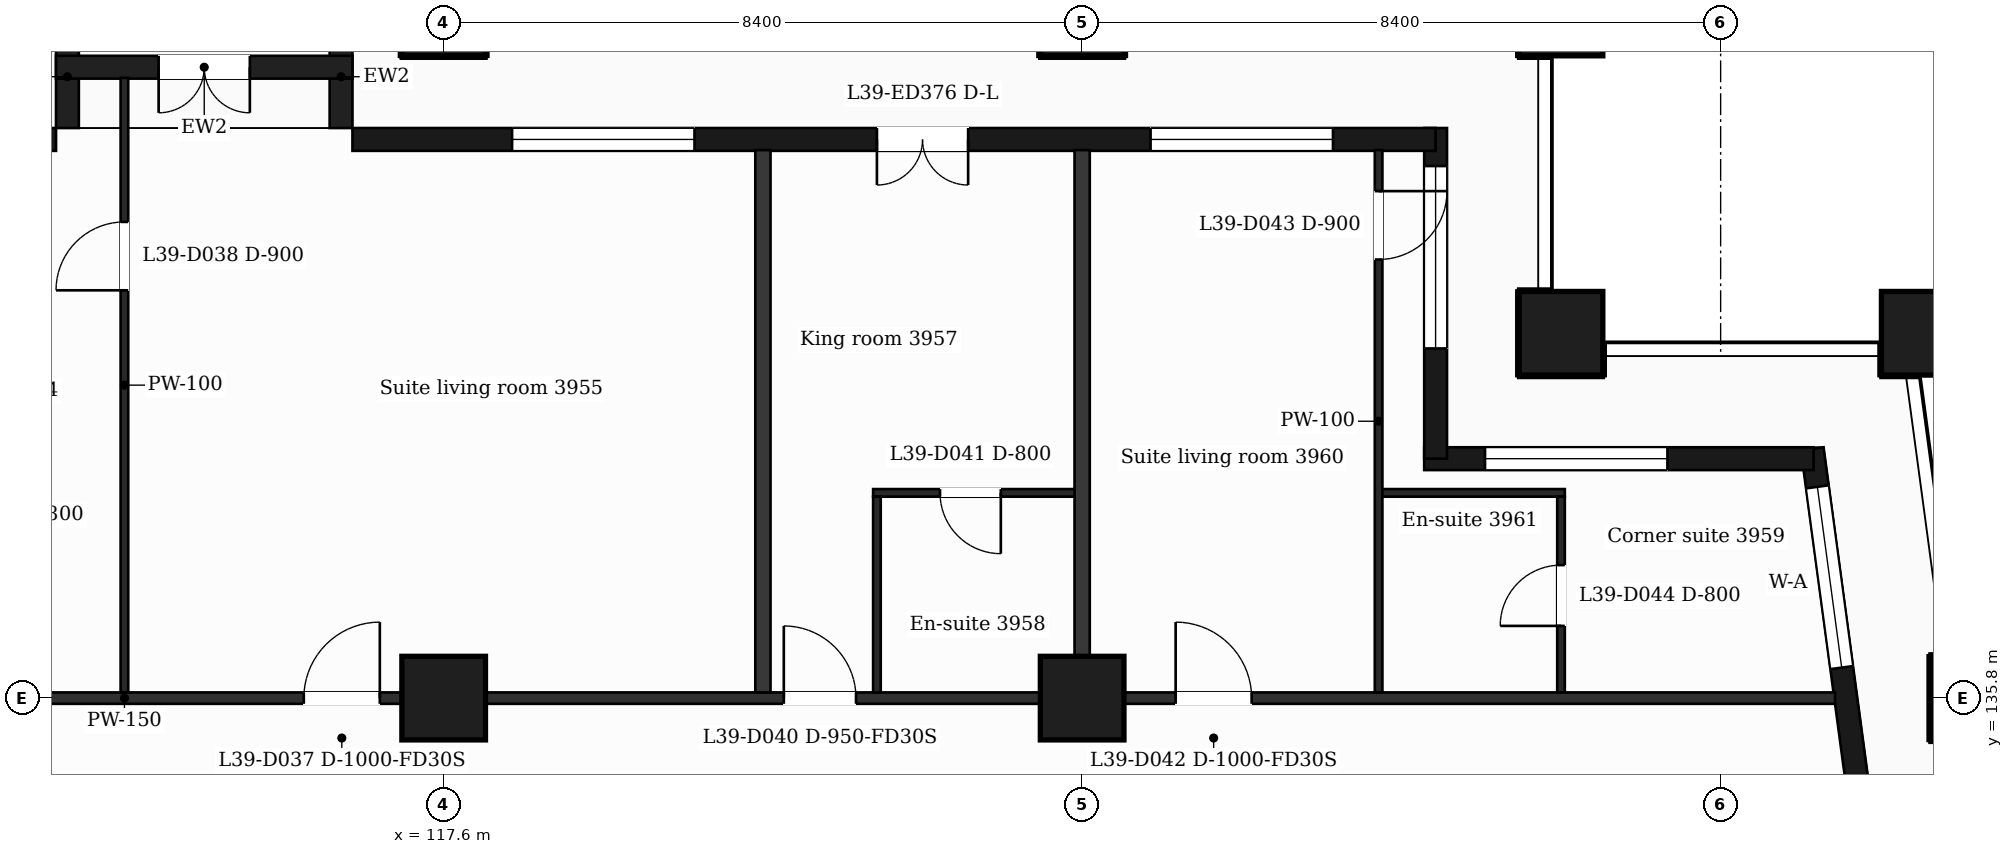
"""IFC4 building model, lengths in metres.
Left out: names, types, materials, properties, quantities, classifications, styles, units other than length and angle.
Written with IfcOpenShell. Run it as: python <this file> out.ifc"""

import sys

from ifc_helpers import new_model, si_unit, direction, frame, frame_2d, origin, origin_2d, place, context, subcontext, project, spatial, rectangle, extrude, element, fill, save


model = new_model("IFC4")
c1 = context("Model", 3, precision=1e-05, world=origin(), true_north=direction((0.0, 1.0)))
c2 = subcontext(c1, "Body", "Model", "MODEL_VIEW")
j1 = project(units=[si_unit("LENGTHUNIT", "METRE"), si_unit("PLANEANGLEUNIT", "RADIAN")], contexts=[c1])
p1 = place(None, origin())
s1 = spatial("IfcSite", under=j1, at=p1, CompositionType="ELEMENT")
p2 = place(p1, origin())
s2 = spatial("IfcBuilding", under=s1, at=p2, CompositionType="ELEMENT")
p3 = place(p2, frame((0.0, 0.0, 166.3)))
s3 = spatial("IfcBuildingStorey", under=s2, at=p3, CompositionType="ELEMENT", Elevation=166.3)
for number, where, z_axis, x_axis in (
    (1, (132.3, 140.6, 0.0), (0.0, 0.0, 1.0), (1.0, 0.0, 0.0)),
    (2, (137.065, 140.6, 0.0), (0.0, 0.0, 1.0), (1.0, 0.0, 0.0)),
    (3, (117.6, 135.8, 0.0), (0.0, 0.0, 1.0), (1.0, 0.0, 0.0)),
    (4, (126.0, 135.8, 0.0), (0.0, 0.0, 1.0), (1.0, 0.0, 0.0)),
    (5, (137.711, 135.8, 0.0), (0.0, 0.0, 1.0), (1.0, 0.0, 0.0)),
    (6, (117.6, 144.8, 0.0), (0.0, 0.0, 1.0), (1.0, 0.0, 0.0)),
    (7, (126.0, 144.8, 0.0), (0.0, 0.0, 1.0), (1.0, 0.0, 0.0)),
    (8, (132.3, 144.8, 0.0), (0.0, 0.0, 1.0), (1.0, 0.0, 0.0)),
):
    element("IfcColumn", number, at=place(p3, frame(where, z_axis=z_axis, x_axis=x_axis)), inside=s3, PredefinedType="COLUMN", context=c2, shape_type="SweptSolid", body=[
        extrude(rectangle(XDim=1.1, YDim=1.1, at=origin_2d()), origin(), (0.0, 0.0, 1.0), 3.7),
    ])
p4 = place(p3, frame((136.504, 132.4, 0.0), z_axis=(0.0, 0.0, 1.0), x_axis=(-0.133399697462, 0.99106231929, 0.0)))
e9 = element("IfcWall", 9, at=p4, inside=s3, PredefinedType="SOLIDWALL", context=c2, shape_type="SweptSolid", body=[
    extrude(rectangle(XDim=6.74, YDim=0.3, at=frame_2d((3.37, 0.0))), origin(), (0.0, 0.0, 1.0), 3.38),
])
p5 = place(p4, frame((1.115, 0.0, 0.0)))
e10 = element("IfcOpeningElement", 10, at=p5, cuts=e9, PredefinedType="OPENING", context=c2, shape_type="SweptSolid", body=[
    extrude(rectangle(XDim=1.2, YDim=2.4, at=frame_2d((0.6, 1.2))), frame((0.0, 0.16, 0.0), z_axis=(0.0, -1.0, 0.0), x_axis=(1.0, 0.0, 0.0)), (0.0, 0.0, 1.0), 0.32),
])
p6 = place(p4, frame((3.835, 0.0, 0.9)))
e11 = element("IfcOpeningElement", 11, at=p6, cuts=e9, PredefinedType="OPENING", context=c2, shape_type="SweptSolid", body=[
    extrude(rectangle(XDim=2.4, YDim=2.1, at=frame_2d((1.2, 1.05))), frame((0.0, 0.16, 0.0), z_axis=(0.0, -1.0, 0.0), x_axis=(1.0, 0.0, 0.0)), (0.0, 0.0, 1.0), 0.32),
])
p7 = place(p3, frame((135.623, 138.95, 0.0), z_axis=(0.0, 0.0, 1.0), x_axis=(-1.0, 0.0, 0.0)))
e12 = element("IfcWall", 12, at=p7, inside=s3, PredefinedType="SOLIDWALL", context=c2, shape_type="SweptSolid", body=[
    extrude(rectangle(XDim=5.123, YDim=0.3, at=frame_2d((2.561, 0.0))), origin(), (0.0, 0.0, 1.0), 3.38),
])
p8 = place(p7, frame((1.923, 0.0, 0.9)))
e13 = element("IfcOpeningElement", 13, at=p8, cuts=e12, PredefinedType="OPENING", context=c2, shape_type="SweptSolid", body=[
    extrude(rectangle(XDim=2.4, YDim=2.1, at=frame_2d((1.2, 1.05))), frame((0.0, 0.16, 0.0), z_axis=(0.0, -1.0, 0.0), x_axis=(1.0, 0.0, 0.0)), (0.0, 0.0, 1.0), 0.32),
])
p9 = place(p3, frame((130.65, 138.95, 0.0), z_axis=(0.0, 0.0, 1.0), x_axis=(0.0, 1.0, 0.0)))
e14 = element("IfcWall", 14, at=p9, inside=s3, PredefinedType="SOLIDWALL", context=c2, shape_type="SweptSolid", body=[
    extrude(rectangle(XDim=4.35, YDim=0.3, at=frame_2d((2.175, 0.0))), origin(), (0.0, 0.0, 1.0), 3.38),
])
p10 = place(p9, frame((1.45, 0.0, 0.9)))
e15 = element("IfcOpeningElement", 15, at=p10, cuts=e14, PredefinedType="OPENING", context=c2, shape_type="SweptSolid", body=[
    extrude(rectangle(XDim=2.4, YDim=2.1, at=frame_2d((1.2, 1.05))), frame((0.0, 0.16, 0.0), z_axis=(0.0, -1.0, 0.0), x_axis=(1.0, 0.0, 0.0)), (0.0, 0.0, 1.0), 0.32),
])
p11 = place(p3, frame((130.65, 143.15, 0.0), z_axis=(0.0, 0.0, 1.0), x_axis=(-1.0, 0.0, 0.0)))
e16 = element("IfcWall", 16, at=p11, inside=s3, PredefinedType="SOLIDWALL", context=c2, shape_type="SweptSolid", body=[
    extrude(rectangle(XDim=14.25, YDim=0.3, at=frame_2d((7.125, 0.0))), origin(), (0.0, 0.0, 1.0), 3.38),
])
p12 = place(p11, frame((1.35, 0.0, 0.9)))
e17 = element("IfcOpeningElement", 17, at=p12, cuts=e16, PredefinedType="OPENING", context=c2, shape_type="SweptSolid", body=[
    extrude(rectangle(XDim=2.4, YDim=2.1, at=frame_2d((1.2, 1.05))), frame((0.0, 0.16, 0.0), z_axis=(0.0, -1.0, 0.0), x_axis=(1.0, 0.0, 0.0)), (0.0, 0.0, 1.0), 0.32),
])
p13 = place(p11, frame((6.15, 0.0, 0.0)))
e18 = element("IfcOpeningElement", 18, at=p13, cuts=e16, PredefinedType="OPENING", context=c2, shape_type="SweptSolid", body=[
    extrude(rectangle(XDim=1.2, YDim=2.4, at=frame_2d((0.6, 1.2))), frame((0.0, 0.16, 0.0), z_axis=(0.0, -1.0, 0.0), x_axis=(1.0, 0.0, 0.0)), (0.0, 0.0, 1.0), 0.32),
])
p14 = place(p11, frame((9.75, 0.0, 0.9)))
e19 = element("IfcOpeningElement", 19, at=p14, cuts=e16, PredefinedType="OPENING", context=c2, shape_type="SweptSolid", body=[
    extrude(rectangle(XDim=2.4, YDim=2.1, at=frame_2d((1.2, 1.05))), frame((0.0, 0.16, 0.0), z_axis=(0.0, -1.0, 0.0), x_axis=(1.0, 0.0, 0.0)), (0.0, 0.0, 1.0), 0.32),
])
p15 = place(p3, frame((112.5, 143.15, 0.0), z_axis=(0.0, 0.0, 1.0), x_axis=(-1.0, 0.0, 0.0)))
e20 = element("IfcWall", 20, at=p15, inside=s3, PredefinedType="SOLIDWALL", context=c2, shape_type="SweptSolid", body=[
    extrude(rectangle(XDim=16.5, YDim=0.3, at=frame_2d((8.25, 0.0))), origin(), (0.0, 0.0, 1.0), 3.38),
])
p16 = place(p15, frame((1.1, 0.0, 0.9)))
e21 = element("IfcOpeningElement", 21, at=p16, cuts=e20, PredefinedType="OPENING", context=c2, shape_type="SweptSolid", body=[
    extrude(rectangle(XDim=1.2, YDim=2.1, at=frame_2d((0.6, 1.05))), frame((0.0, 0.16, 0.0), z_axis=(0.0, -1.0, 0.0), x_axis=(1.0, 0.0, 0.0)), (0.0, 0.0, 1.0), 0.32),
])
p17 = place(p15, frame((4.2, 0.0, 0.9)))
e22 = element("IfcOpeningElement", 22, at=p17, cuts=e20, PredefinedType="OPENING", context=c2, shape_type="SweptSolid", body=[
    extrude(rectangle(XDim=2.4, YDim=2.1, at=frame_2d((1.2, 1.05))), frame((0.0, 0.16, 0.0), z_axis=(0.0, -1.0, 0.0), x_axis=(1.0, 0.0, 0.0)), (0.0, 0.0, 1.0), 0.32),
])
p18 = place(p15, frame((8.4, 0.0, 0.9)))
e23 = element("IfcOpeningElement", 23, at=p18, cuts=e20, PredefinedType="OPENING", context=c2, shape_type="SweptSolid", body=[
    extrude(rectangle(XDim=2.4, YDim=2.1, at=frame_2d((1.2, 1.05))), frame((0.0, 0.16, 0.0), z_axis=(0.0, -1.0, 0.0), x_axis=(1.0, 0.0, 0.0)), (0.0, 0.0, 1.0), 0.32),
])
p19 = place(p15, frame((12.3, 0.0, 0.0)))
e24 = element("IfcOpeningElement", 24, at=p19, cuts=e20, PredefinedType="OPENING", context=c2, shape_type="SweptSolid", body=[
    extrude(rectangle(XDim=1.2, YDim=2.4, at=frame_2d((0.6, 1.2))), frame((0.0, 0.16, 0.0), z_axis=(0.0, -1.0, 0.0), x_axis=(1.0, 0.0, 0.0)), (0.0, 0.0, 1.0), 0.32),
])
p20 = place(p15, frame((14.1, 0.0, 0.9)))
e25 = element("IfcOpeningElement", 25, at=p20, cuts=e20, PredefinedType="OPENING", context=c2, shape_type="SweptSolid", body=[
    extrude(rectangle(XDim=1.2, YDim=2.1, at=frame_2d((0.6, 1.05))), frame((0.0, 0.16, 0.0), z_axis=(0.0, -1.0, 0.0), x_axis=(1.0, 0.0, 0.0)), (0.0, 0.0, 1.0), 0.32),
])
for number, where, z_axis, x_axis in (
    (26, (116.25, 143.3, 0.0), (0.0, 0.0, 1.0), (0.0, 1.0, 0.0)),
    (27, (112.65, 143.3, 0.0), (0.0, 0.0, 1.0), (0.0, 1.0, 0.0)),
):
    element("IfcWall", number, at=place(p3, frame(where, z_axis=z_axis, x_axis=x_axis)), inside=s3, PredefinedType="SOLIDWALL", context=c2, shape_type="SweptSolid", body=[
        extrude(rectangle(XDim=1.35, YDim=0.3, at=frame_2d((0.675, 0.0))), origin(), (0.0, 0.0, 1.0), 3.38),
    ])
p21 = place(p3, frame((116.4, 144.1, 0.0), z_axis=(0.0, 0.0, 1.0), x_axis=(-1.0, 0.0, 0.0)))
e28 = element("IfcWall", 28, at=p21, inside=s3, PredefinedType="SOLIDWALL", context=c2, shape_type="SweptSolid", body=[
    extrude(rectangle(XDim=3.9, YDim=0.3, at=frame_2d((1.95, 0.0))), origin(), (0.0, 0.0, 1.0), 3.38),
])
p22 = place(p21, frame((1.35, 0.0, 0.0)))
e29 = element("IfcOpeningElement", 29, at=p22, cuts=e28, PredefinedType="OPENING", context=c2, shape_type="SweptSolid", body=[
    extrude(rectangle(XDim=1.2, YDim=2.4, at=frame_2d((0.6, 1.2))), frame((0.0, 0.16, 0.0), z_axis=(0.0, -1.0, 0.0), x_axis=(1.0, 0.0, 0.0)), (0.0, 0.0, 1.0), 0.32),
])
p23 = place(p3, frame((90.895, 135.8, 0.0), z_axis=(0.0, 0.0, 1.0), x_axis=(1.0, 0.0, 0.0)))
e30 = element("IfcWall", 30, at=p23, inside=s3, PredefinedType="PARTITIONING", context=c2, shape_type="SweptSolid", body=[
    extrude(rectangle(XDim=45.011, YDim=0.15, at=frame_2d((22.505, 0.0))), origin(), (0.0, 0.0, 1.0), 3.38),
])
p24 = place(p23, frame((7.675, 0.0, 0.0)))
e31 = element("IfcOpeningElement", 31, at=p24, cuts=e30, PredefinedType="OPENING", context=c2, shape_type="SweptSolid", body=[
    extrude(rectangle(XDim=1.0, YDim=2.1, at=frame_2d((0.5, 1.05))), frame((0.0, 0.085, 0.0), z_axis=(0.0, -1.0, 0.0), x_axis=(1.0, 0.0, 0.0)), (0.0, 0.0, 1.0), 0.17),
])
p25 = place(p23, frame((11.505, 0.0, 0.0)))
e32 = element("IfcOpeningElement", 32, at=p25, cuts=e30, PredefinedType="OPENING", context=c2, shape_type="SweptSolid", body=[
    extrude(rectangle(XDim=1.0, YDim=2.1, at=frame_2d((0.5, 1.05))), frame((0.0, 0.085, 0.0), z_axis=(0.0, -1.0, 0.0), x_axis=(1.0, 0.0, 0.0)), (0.0, 0.0, 1.0), 0.17),
])
p26 = place(p23, frame((24.865, 0.0, 0.0)))
e33 = element("IfcOpeningElement", 33, at=p26, cuts=e30, PredefinedType="OPENING", context=c2, shape_type="SweptSolid", body=[
    extrude(rectangle(XDim=1.0, YDim=2.1, at=frame_2d((0.5, 1.05))), frame((0.0, 0.085, 0.0), z_axis=(0.0, -1.0, 0.0), x_axis=(1.0, 0.0, 0.0)), (0.0, 0.0, 1.0), 0.17),
])
p27 = place(p23, frame((31.18, 0.0, 0.0)))
e34 = element("IfcOpeningElement", 34, at=p27, cuts=e30, PredefinedType="OPENING", context=c2, shape_type="SweptSolid", body=[
    extrude(rectangle(XDim=0.95, YDim=2.1, at=frame_2d((0.475, 1.05))), frame((0.0, 0.085, 0.0), z_axis=(0.0, -1.0, 0.0), x_axis=(1.0, 0.0, 0.0)), (0.0, 0.0, 1.0), 0.17),
])
p28 = place(p23, frame((36.335, 0.0, 0.0)))
e35 = element("IfcOpeningElement", 35, at=p28, cuts=e30, PredefinedType="OPENING", context=c2, shape_type="SweptSolid", body=[
    extrude(rectangle(XDim=1.0, YDim=2.1, at=frame_2d((0.5, 1.05))), frame((0.0, 0.085, 0.0), z_axis=(0.0, -1.0, 0.0), x_axis=(1.0, 0.0, 0.0)), (0.0, 0.0, 1.0), 0.17),
])
p29 = place(p3, frame((123.25, 138.5, 0.0), z_axis=(0.0, 0.0, 1.0), x_axis=(1.0, 0.0, 0.0)))
e36 = element("IfcWall", 36, at=p29, inside=s3, PredefinedType="PARTITIONING", context=c2, shape_type="SweptSolid", body=[
    extrude(rectangle(XDim=2.75, YDim=0.1, at=frame_2d((1.375, 0.0))), origin(), (0.0, 0.0, 1.0), 3.38),
])
p30 = place(p29, frame((0.88, 0.0, 0.0)))
e37 = element("IfcOpeningElement", 37, at=p30, cuts=e36, PredefinedType="OPENING", context=c2, shape_type="SweptSolid", body=[
    extrude(rectangle(XDim=0.8, YDim=2.1, at=frame_2d((0.4, 1.05))), frame((0.0, 0.06, 0.0), z_axis=(0.0, -1.0, 0.0), x_axis=(1.0, 0.0, 0.0)), (0.0, 0.0, 1.0), 0.12),
])
p31 = place(p3, frame((129.9, 138.5, 0.0), z_axis=(0.0, 0.0, 1.0), x_axis=(1.0, 0.0, 0.0)))
e38 = element("IfcWall", 38, at=p31, inside=s3, PredefinedType="PARTITIONING", context=c2, shape_type="SweptSolid", body=[
    extrude(rectangle(XDim=2.45, YDim=0.1, at=frame_2d((1.225, 0.0))), origin(), (0.0, 0.0, 1.0), 3.38),
])
p32 = place(p3, frame((113.4, 135.875, 0.0), z_axis=(0.0, 0.0, 1.0), x_axis=(0.0, 1.0, 0.0)))
e39 = element("IfcWall", 39, at=p32, inside=s3, PredefinedType="PARTITIONING", context=c2, shape_type="SweptSolid", body=[
    extrude(rectangle(XDim=8.085, YDim=0.1, at=frame_2d((4.042, 0.0))), origin(), (0.0, 0.0, 1.0), 3.38),
])
p33 = place(p32, frame((5.29, 0.0, 0.0)))
e40 = element("IfcOpeningElement", 40, at=p33, cuts=e39, PredefinedType="OPENING", context=c2, shape_type="SweptSolid", body=[
    extrude(rectangle(XDim=0.9, YDim=2.1, at=frame_2d((0.45, 1.05))), frame((0.0, 0.06, 0.0), z_axis=(0.0, -1.0, 0.0), x_axis=(1.0, 0.0, 0.0)), (0.0, 0.0, 1.0), 0.12),
])
p34 = place(p3, frame((121.8, 135.875, 0.0), z_axis=(0.0, 0.0, 1.0), x_axis=(0.0, 1.0, 0.0)))
e41 = element("IfcWall", 41, at=p34, inside=s3, PredefinedType="PARTITIONING", context=c2, shape_type="SweptSolid", body=[
    extrude(rectangle(XDim=7.135, YDim=0.2, at=frame_2d((3.567, 0.0))), origin(), (0.0, 0.0, 1.0), 3.38),
])
p35 = place(p3, frame((123.3, 135.875, 0.0), z_axis=(0.0, 0.0, 1.0), x_axis=(0.0, 1.0, 0.0)))
e42 = element("IfcWall", 42, at=p35, inside=s3, PredefinedType="PARTITIONING", context=c2, shape_type="SweptSolid", body=[
    extrude(rectangle(XDim=2.575, YDim=0.1, at=frame_2d((1.288, 0.0))), origin(), (0.0, 0.0, 1.0), 3.38),
])
p36 = place(p3, frame((126.0, 135.875, 0.0), z_axis=(0.0, 0.0, 1.0), x_axis=(0.0, 1.0, 0.0)))
e43 = element("IfcWall", 43, at=p36, inside=s3, PredefinedType="PARTITIONING", context=c2, shape_type="SweptSolid", body=[
    extrude(rectangle(XDim=7.135, YDim=0.2, at=frame_2d((3.567, 0.0))), origin(), (0.0, 0.0, 1.0), 3.38),
])
p37 = place(p3, frame((129.9, 135.875, 0.0), z_axis=(0.0, 0.0, 1.0), x_axis=(0.0, 1.0, 0.0)))
e44 = element("IfcWall", 44, at=p37, inside=s3, PredefinedType="PARTITIONING", context=c2, shape_type="SweptSolid", body=[
    extrude(rectangle(XDim=7.135, YDim=0.1, at=frame_2d((3.567, 0.0))), origin(), (0.0, 0.0, 1.0), 3.38),
])
p38 = place(p37, frame((5.695, 0.0, 0.0)))
e45 = element("IfcOpeningElement", 45, at=p38, cuts=e44, PredefinedType="OPENING", context=c2, shape_type="SweptSolid", body=[
    extrude(rectangle(XDim=0.9, YDim=2.1, at=frame_2d((0.45, 1.05))), frame((0.0, 0.06, 0.0), z_axis=(0.0, -1.0, 0.0), x_axis=(1.0, 0.0, 0.0)), (0.0, 0.0, 1.0), 0.12),
])
p39 = place(p3, frame((132.3, 135.875, 0.0), z_axis=(0.0, 0.0, 1.0), x_axis=(0.0, 1.0, 0.0)))
e46 = element("IfcWall", 46, at=p39, inside=s3, PredefinedType="PARTITIONING", context=c2, shape_type="SweptSolid", body=[
    extrude(rectangle(XDim=2.575, YDim=0.1, at=frame_2d((1.288, 0.0))), origin(), (0.0, 0.0, 1.0), 3.38),
])
p40 = place(p39, frame((0.875, 0.0, 0.0)))
e47 = element("IfcOpeningElement", 47, at=p40, cuts=e46, PredefinedType="OPENING", context=c2, shape_type="SweptSolid", body=[
    extrude(rectangle(XDim=0.8, YDim=2.1, at=frame_2d((0.4, 1.05))), frame((0.0, 0.06, 0.0), z_axis=(0.0, -1.0, 0.0), x_axis=(1.0, 0.0, 0.0)), (0.0, 0.0, 1.0), 0.12),
])
p41 = place(p6, origin())
e48 = element("IfcWindow", 48, at=p41, inside=s3, PartitioningType="SINGLE_PANEL", PredefinedType="WINDOW", context=c2, shape_type="SweptSolid", body=[
    extrude(rectangle(XDim=2.4, YDim=2.1, at=frame_2d((1.2, 1.05))), frame((0.0, 0.03, 0.0), z_axis=(0.0, -1.0, 0.0), x_axis=(1.0, 0.0, 0.0)), (0.0, 0.0, 1.0), 0.06),
])
fill(e11, e48)
p42 = place(p8, origin())
e49 = element("IfcWindow", 49, at=p42, inside=s3, PartitioningType="SINGLE_PANEL", PredefinedType="WINDOW", context=c2, shape_type="SweptSolid", body=[
    extrude(rectangle(XDim=2.4, YDim=2.1, at=frame_2d((1.2, 1.05))), frame((0.0, 0.03, 0.0), z_axis=(0.0, -1.0, 0.0), x_axis=(1.0, 0.0, 0.0)), (0.0, 0.0, 1.0), 0.06),
])
fill(e13, e49)
p43 = place(p10, origin())
e50 = element("IfcWindow", 50, at=p43, inside=s3, PartitioningType="SINGLE_PANEL", PredefinedType="WINDOW", context=c2, shape_type="SweptSolid", body=[
    extrude(rectangle(XDim=2.4, YDim=2.1, at=frame_2d((1.2, 1.05))), frame((0.0, 0.03, 0.0), z_axis=(0.0, -1.0, 0.0), x_axis=(1.0, 0.0, 0.0)), (0.0, 0.0, 1.0), 0.06),
])
fill(e15, e50)
p44 = place(p12, origin())
e51 = element("IfcWindow", 51, at=p44, inside=s3, PartitioningType="SINGLE_PANEL", PredefinedType="WINDOW", context=c2, shape_type="SweptSolid", body=[
    extrude(rectangle(XDim=2.4, YDim=2.1, at=frame_2d((1.2, 1.05))), frame((0.0, 0.03, 0.0), z_axis=(0.0, -1.0, 0.0), x_axis=(1.0, 0.0, 0.0)), (0.0, 0.0, 1.0), 0.06),
])
fill(e17, e51)
p45 = place(p13, origin())
e52 = element("IfcDoor", 52, at=p45, inside=s3, OperationType="DOUBLE_DOOR_SINGLE_SWING", PredefinedType="DOOR", context=c2, shape_type="SweptSolid", body=[
    extrude(rectangle(XDim=1.2, YDim=2.4, at=frame_2d((0.6, 1.2))), frame((0.0, 0.025, 0.0), z_axis=(0.0, -1.0, 0.0), x_axis=(1.0, 0.0, 0.0)), (0.0, 0.0, 1.0), 0.05),
])
fill(e18, e52)
p46 = place(p14, origin())
e53 = element("IfcWindow", 53, at=p46, inside=s3, PartitioningType="SINGLE_PANEL", PredefinedType="WINDOW", context=c2, shape_type="SweptSolid", body=[
    extrude(rectangle(XDim=2.4, YDim=2.1, at=frame_2d((1.2, 1.05))), frame((0.0, 0.03, 0.0), z_axis=(0.0, -1.0, 0.0), x_axis=(1.0, 0.0, 0.0)), (0.0, 0.0, 1.0), 0.06),
])
fill(e19, e53)
p47 = place(p22, origin())
e54 = element("IfcDoor", 54, at=p47, inside=s3, OperationType="DOUBLE_DOOR_SINGLE_SWING", PredefinedType="DOOR", context=c2, shape_type="SweptSolid", body=[
    extrude(rectangle(XDim=1.2, YDim=2.4, at=frame_2d((0.6, 1.2))), frame((0.0, 0.025, 0.0), z_axis=(0.0, -1.0, 0.0), x_axis=(1.0, 0.0, 0.0)), (0.0, 0.0, 1.0), 0.05),
])
fill(e29, e54)
p48 = place(p26, origin())
e55 = element("IfcDoor", 55, at=p48, inside=s3, OperationType="SINGLE_SWING_RIGHT", PredefinedType="DOOR", context=c2, shape_type="SweptSolid", body=[
    extrude(rectangle(XDim=1.0, YDim=2.1, at=frame_2d((0.5, 1.05))), frame((0.0, 0.025, 0.0), z_axis=(0.0, -1.0, 0.0), x_axis=(1.0, 0.0, 0.0)), (0.0, 0.0, 1.0), 0.05),
])
fill(e33, e55)
p49 = place(p33, origin())
e56 = element("IfcDoor", 56, at=p49, inside=s3, OperationType="SINGLE_SWING_LEFT", PredefinedType="DOOR", context=c2, shape_type="SweptSolid", body=[
    extrude(rectangle(XDim=0.9, YDim=2.1, at=frame_2d((0.45, 1.05))), frame((0.0, 0.025, 0.0), z_axis=(0.0, -1.0, 0.0), x_axis=(1.0, 0.0, 0.0)), (0.0, 0.0, 1.0), 0.05),
])
fill(e40, e56)
p50 = place(p27, origin())
e57 = element("IfcDoor", 57, at=p50, inside=s3, OperationType="SINGLE_SWING_LEFT", PredefinedType="DOOR", context=c2, shape_type="SweptSolid", body=[
    extrude(rectangle(XDim=0.95, YDim=2.1, at=frame_2d((0.475, 1.05))), frame((0.0, 0.025, 0.0), z_axis=(0.0, -1.0, 0.0), x_axis=(1.0, 0.0, 0.0)), (0.0, 0.0, 1.0), 0.05),
])
fill(e34, e57)
p51 = place(p30, origin())
e58 = element("IfcDoor", 58, at=p51, inside=s3, OperationType="SINGLE_SWING_RIGHT", PredefinedType="DOOR", context=c2, shape_type="SweptSolid", body=[
    extrude(rectangle(XDim=0.8, YDim=2.1, at=frame_2d((0.4, 1.05))), frame((0.0, 0.025, 0.0), z_axis=(0.0, -1.0, 0.0), x_axis=(1.0, 0.0, 0.0)), (0.0, 0.0, 1.0), 0.05),
])
fill(e37, e58)
p52 = place(p28, origin())
e59 = element("IfcDoor", 59, at=p52, inside=s3, OperationType="SINGLE_SWING_LEFT", PredefinedType="DOOR", context=c2, shape_type="SweptSolid", body=[
    extrude(rectangle(XDim=1.0, YDim=2.1, at=frame_2d((0.5, 1.05))), frame((0.0, 0.025, 0.0), z_axis=(0.0, -1.0, 0.0), x_axis=(1.0, 0.0, 0.0)), (0.0, 0.0, 1.0), 0.05),
])
fill(e35, e59)
p53 = place(p38, origin())
e60 = element("IfcDoor", 60, at=p53, inside=s3, OperationType="SINGLE_SWING_RIGHT", PredefinedType="DOOR", context=c2, shape_type="SweptSolid", body=[
    extrude(rectangle(XDim=0.9, YDim=2.1, at=frame_2d((0.45, 1.05))), frame((0.0, 0.025, 0.0), z_axis=(0.0, -1.0, 0.0), x_axis=(1.0, 0.0, 0.0)), (0.0, 0.0, 1.0), 0.05),
])
fill(e45, e60)
p54 = place(p40, origin())
e61 = element("IfcDoor", 61, at=p54, inside=s3, OperationType="SINGLE_SWING_LEFT", PredefinedType="DOOR", context=c2, shape_type="SweptSolid", body=[
    extrude(rectangle(XDim=0.8, YDim=2.1, at=frame_2d((0.4, 1.05))), frame((0.0, 0.025, 0.0), z_axis=(0.0, -1.0, 0.0), x_axis=(1.0, 0.0, 0.0)), (0.0, 0.0, 1.0), 0.05),
])
fill(e47, e61)
save(model, sys.argv[1])
